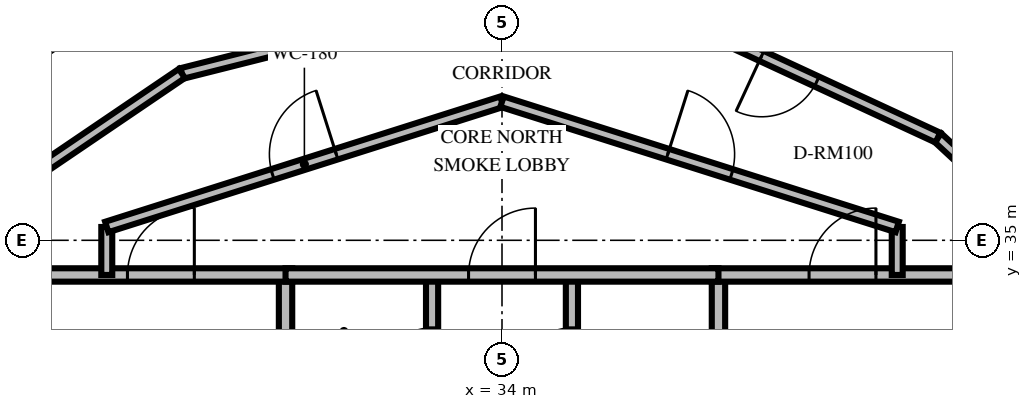
"""IFC4 building model, lengths in metres.
Left out: names, types, materials, properties, quantities, classifications, styles, units other than length and angle.
Written with IfcOpenShell. Run it as: python <this file> out.ifc"""

import sys

from ifc_helpers import new_model, si_unit, direction, frame, frame_2d, origin, place, context, subcontext, project, spatial, rectangle, extrude, element, fill, save


model = new_model("IFC4")
c1 = context("Model", 3, precision=1e-05, world=origin(), true_north=direction((0.0, 1.0)))
c2 = subcontext(c1, "Body", "Model", "MODEL_VIEW")
j1 = project(units=[si_unit("LENGTHUNIT", "METRE"), si_unit("PLANEANGLEUNIT", "RADIAN")], contexts=[c1])
p1 = place(None, origin())
s1 = spatial("IfcSite", under=j1, at=p1, CompositionType="ELEMENT")
p2 = place(p1, origin())
s2 = spatial("IfcBuilding", under=s1, at=p2, CompositionType="ELEMENT")
p3 = place(p2, frame((0.0, 0.0, 255.6)))
s3 = spatial("IfcBuildingStorey", under=s2, at=p3, CompositionType="ELEMENT", Elevation=255.6)
p4 = place(p3, frame((30.44, 30.05, 0.0), z_axis=(0.0, 0.0, 1.0), x_axis=(0.0, 1.0, 0.0)))
e1 = element("IfcWall", 1, at=p4, inside=s3, PredefinedType="SOLIDWALL", context=c2, shape_type="SweptSolid", body=[
    extrude(rectangle(XDim=4.38, YDim=0.22, at=frame_2d((2.19, 0.0))), origin(), (0.0, 0.0, 1.0), 2.46),
])
p5 = place(p4, frame((0.8, 0.0, 0.0)))
e2 = element("IfcOpeningElement", 2, at=p5, cuts=e1, PredefinedType="OPENING", context=c2, shape_type="SweptSolid", body=[
    extrude(rectangle(XDim=1.05, YDim=2.1, at=frame_2d((0.525, 1.05))), frame((0.0, 0.12, 0.0), z_axis=(0.0, -1.0, 0.0), x_axis=(1.0, 0.0, 0.0)), (0.0, 0.0, 1.0), 0.24),
])
p6 = place(p3, frame((26.24, 34.43, 0.0), z_axis=(0.0, 0.0, 1.0), x_axis=(1.0, 0.0, 0.0)))
e3 = element("IfcWall", 3, at=p6, inside=s3, PredefinedType="SOLIDWALL", context=c2, shape_type="SweptSolid", body=[
    extrude(rectangle(XDim=4.31, YDim=0.22, at=frame_2d((2.155, 0.0))), origin(), (0.0, 0.0, 1.0), 2.46),
])
p7 = place(p6, frame((1.6, 0.0, 0.0)))
e4 = element("IfcOpeningElement", 4, at=p7, cuts=e3, PredefinedType="OPENING", context=c2, shape_type="SweptSolid", body=[
    extrude(rectangle(XDim=1.1, YDim=2.15, at=frame_2d((0.55, 1.075))), frame((0.0, 0.12, 0.0), z_axis=(0.0, -1.0, 0.0), x_axis=(1.0, 0.0, 0.0)), (0.0, 0.0, 1.0), 0.24),
])
p8 = place(p3, frame((32.85, 30.05, 0.0), z_axis=(0.0, 0.0, 1.0), x_axis=(0.0, 1.0, 0.0)))
e5 = element("IfcWall", 5, at=p8, inside=s3, PredefinedType="SOLIDWALL", context=c2, shape_type="SweptSolid", body=[
    extrude(rectangle(XDim=4.38, YDim=0.2, at=frame_2d((2.19, 0.0))), origin(), (0.0, 0.0, 1.0), 2.46),
])
p9 = place(p8, frame((2.65, 0.0, 0.0)))
e6 = element("IfcOpeningElement", 6, at=p9, cuts=e5, PredefinedType="OPENING", context=c2, shape_type="SweptSolid", body=[
    extrude(rectangle(XDim=0.86, YDim=2.05, at=frame_2d((0.43, 1.025))), frame((0.0, 0.11, 0.0), z_axis=(0.0, -1.0, 0.0), x_axis=(1.0, 0.0, 0.0)), (0.0, 0.0, 1.0), 0.22),
])
p10 = place(p3, frame((37.56, 30.05, 0.0), z_axis=(0.0, 0.0, 1.0), x_axis=(0.0, 1.0, 0.0)))
e7 = element("IfcWall", 7, at=p10, inside=s3, PredefinedType="SOLIDWALL", context=c2, shape_type="SweptSolid", body=[
    extrude(rectangle(XDim=4.38, YDim=0.22, at=frame_2d((2.19, 0.0))), origin(), (0.0, 0.0, 1.0), 2.46),
])
p11 = place(p10, frame((0.8, 0.0, 0.0)))
e8 = element("IfcOpeningElement", 8, at=p11, cuts=e7, PredefinedType="OPENING", context=c2, shape_type="SweptSolid", body=[
    extrude(rectangle(XDim=1.05, YDim=2.1, at=frame_2d((0.525, 1.05))), frame((0.0, 0.12, 0.0), z_axis=(0.0, -1.0, 0.0), x_axis=(1.0, 0.0, 0.0)), (0.0, 0.0, 1.0), 0.24),
])
p12 = place(p3, frame((37.45, 34.43, 0.0), z_axis=(0.0, 0.0, 1.0), x_axis=(1.0, 0.0, 0.0)))
e9 = element("IfcWall", 9, at=p12, inside=s3, PredefinedType="SOLIDWALL", context=c2, shape_type="SweptSolid", body=[
    extrude(rectangle(XDim=4.31, YDim=0.22, at=frame_2d((2.155, 0.0))), origin(), (0.0, 0.0, 1.0), 2.46),
])
p13 = place(p12, frame((1.6, 0.0, 0.0)))
e10 = element("IfcOpeningElement", 10, at=p13, cuts=e9, PredefinedType="OPENING", context=c2, shape_type="SweptSolid", body=[
    extrude(rectangle(XDim=1.1, YDim=2.15, at=frame_2d((0.55, 1.075))), frame((0.0, 0.12, 0.0), z_axis=(0.0, -1.0, 0.0), x_axis=(1.0, 0.0, 0.0)), (0.0, 0.0, 1.0), 0.24),
])
p14 = place(p3, frame((35.15, 30.05, 0.0), z_axis=(0.0, 0.0, 1.0), x_axis=(0.0, 1.0, 0.0)))
e11 = element("IfcWall", 11, at=p14, inside=s3, PredefinedType="SOLIDWALL", context=c2, shape_type="SweptSolid", body=[
    extrude(rectangle(XDim=4.38, YDim=0.2, at=frame_2d((2.19, 0.0))), origin(), (0.0, 0.0, 1.0), 2.46),
])
p15 = place(p14, frame((2.65, 0.0, 0.0)))
e12 = element("IfcOpeningElement", 12, at=p15, cuts=e11, PredefinedType="OPENING", context=c2, shape_type="SweptSolid", body=[
    extrude(rectangle(XDim=0.86, YDim=2.05, at=frame_2d((0.43, 1.025))), frame((0.0, 0.11, 0.0), z_axis=(0.0, -1.0, 0.0), x_axis=(1.0, 0.0, 0.0)), (0.0, 0.0, 1.0), 0.22),
])
p16 = place(p3, frame((30.44, 34.43, 0.0), z_axis=(0.0, 0.0, 1.0), x_axis=(1.0, 0.0, 0.0)))
e13 = element("IfcWall", 13, at=p16, inside=s3, PredefinedType="SOLIDWALL", context=c2, shape_type="SweptSolid", body=[
    extrude(rectangle(XDim=7.12, YDim=0.22, at=frame_2d((3.56, 0.0))), origin(), (0.0, 0.0, 1.0), 2.46),
])
p17 = place(p16, frame((3.01, 0.0, 0.0)))
e14 = element("IfcOpeningElement", 14, at=p17, cuts=e13, PredefinedType="OPENING", context=c2, shape_type="SweptSolid", body=[
    extrude(rectangle(XDim=1.1, YDim=2.15, at=frame_2d((0.55, 1.075))), frame((0.0, 0.12, 0.0), z_axis=(0.0, -1.0, 0.0), x_axis=(1.0, 0.0, 0.0)), (0.0, 0.0, 1.0), 0.24),
])
for number, where, z_axis, x_axis in (
    (15, (27.5, 34.43, 0.0), (0.0, 0.0, 1.0), (0.0, 1.0, 0.0)),
    (16, (40.5, 35.219, 0.0), (0.0, 0.0, 1.0), (0.0, -1.0, 0.0)),
):
    element("IfcWall", number, at=place(p3, frame(where, z_axis=z_axis, x_axis=x_axis)), inside=s3, PredefinedType="PARTITIONING", context=c2, shape_type="SweptSolid", body=[
        extrude(rectangle(XDim=0.789, YDim=0.18, at=frame_2d((0.395, 0.0))), origin(), (0.0, 0.0, 1.0), 2.46),
    ])
p18 = place(p3, frame((27.5, 35.219, 0.0), z_axis=(0.0, 0.0, 1.0), x_axis=(0.953228121756, 0.302251795518, 0.0)))
e17 = element("IfcWall", 17, at=p18, inside=s3, PredefinedType="PARTITIONING", context=c2, shape_type="SweptSolid", body=[
    extrude(rectangle(XDim=6.819, YDim=0.18, at=frame_2d((3.409, 0.0))), origin(), (0.0, 0.0, 1.0), 2.46),
])
p19 = place(p18, frame((2.86, 0.0, 0.0)))
e18 = element("IfcOpeningElement", 18, at=p19, cuts=e17, PredefinedType="OPENING", context=c2, shape_type="SweptSolid", body=[
    extrude(rectangle(XDim=1.1, YDim=2.15, at=frame_2d((0.55, 1.075))), frame((0.0, 0.1, 0.0), z_axis=(0.0, -1.0, 0.0), x_axis=(1.0, 0.0, 0.0)), (0.0, 0.0, 1.0), 0.2),
])
p20 = place(p3, frame((34.0, 37.28, 0.0), z_axis=(0.0, 0.0, 1.0), x_axis=(0.953228121756, -0.302251795518, 0.0)))
e19 = element("IfcWall", 19, at=p20, inside=s3, PredefinedType="PARTITIONING", context=c2, shape_type="SweptSolid", body=[
    extrude(rectangle(XDim=6.819, YDim=0.18, at=frame_2d((3.409, 0.0))), origin(), (0.0, 0.0, 1.0), 2.46),
])
p21 = place(p20, frame((2.86, 0.0, 0.0)))
e20 = element("IfcOpeningElement", 20, at=p21, cuts=e19, PredefinedType="OPENING", context=c2, shape_type="SweptSolid", body=[
    extrude(rectangle(XDim=1.1, YDim=2.15, at=frame_2d((0.55, 1.075))), frame((0.0, 0.1, 0.0), z_axis=(0.0, -1.0, 0.0), x_axis=(1.0, 0.0, 0.0)), (0.0, 0.0, 1.0), 0.2),
])
p22 = place(p3, frame((44.121, 33.95, 0.0), z_axis=(0.0, 0.0, 1.0), x_axis=(-0.733136774685, 0.680081222799, 0.0)))
e21 = element("IfcWall", 21, at=p22, inside=s3, PredefinedType="PARTITIONING", context=c2, shape_type="SweptSolid", body=[
    extrude(rectangle(XDim=4.026, YDim=0.18, at=frame_2d((2.013, 0.0))), origin(), (0.0, 0.0, 1.0), 2.46),
])
p23 = place(p3, frame((41.169, 36.688, 0.0), z_axis=(0.0, 0.0, 1.0), x_axis=(-0.907413819327, 0.420238218746, 0.0)))
e22 = element("IfcWall", 22, at=p23, inside=s3, PredefinedType="PARTITIONING", context=c2, shape_type="SweptSolid", body=[
    extrude(rectangle(XDim=4.027, YDim=0.18, at=frame_2d((2.013, 0.0))), origin(), (0.0, 0.0, 1.0), 2.46),
])
p24 = place(p23, frame((2.195, 0.0, 0.0)))
e23 = element("IfcOpeningElement", 23, at=p24, cuts=e22, PredefinedType="OPENING", context=c2, shape_type="SweptSolid", body=[
    extrude(rectangle(XDim=1.0, YDim=2.15, at=frame_2d((0.5, 1.075))), frame((0.0, 0.1, 0.0), z_axis=(0.0, -1.0, 0.0), x_axis=(1.0, 0.0, 0.0)), (0.0, 0.0, 1.0), 0.2),
])
p25 = place(p3, frame((33.069, 38.836, 0.0), z_axis=(0.0, 0.0, 1.0), x_axis=(-0.969665095123, -0.244437319777, 0.0)))
e24 = element("IfcWall", 24, at=p25, inside=s3, PredefinedType="PARTITIONING", context=c2, shape_type="SweptSolid", body=[
    extrude(rectangle(XDim=4.469, YDim=0.18, at=frame_2d((2.235, 0.0))), origin(), (0.0, 0.0, 1.0), 2.46),
])
p26 = place(p3, frame((28.735, 37.744, 0.0), z_axis=(0.0, 0.0, 1.0), x_axis=(-0.827595393885, -0.561325096552, 0.0)))
e25 = element("IfcWall", 25, at=p26, inside=s3, PredefinedType="PARTITIONING", context=c2, shape_type="SweptSolid", body=[
    extrude(rectangle(XDim=4.47, YDim=0.18, at=frame_2d((2.235, 0.0))), origin(), (0.0, 0.0, 1.0), 2.46),
])
p27 = place(p3, frame((28.08, 39.204, 0.0), z_axis=(0.0, 0.0, 1.0), x_axis=(-0.827561219807, -0.561375478153, 0.0)))
e26 = element("IfcWall", 26, at=p27, inside=s3, PredefinedType="PARTITIONING", context=c2, shape_type="SweptSolid", body=[
    extrude(rectangle(XDim=5.025, YDim=0.125, at=frame_2d((2.513, 0.0))), origin(), (0.0, 0.0, 1.0), 2.46),
])
p28 = place(p7, origin())
e27 = element("IfcDoor", 27, at=p28, inside=s3, OperationType="SINGLE_SWING_RIGHT", PredefinedType="DOOR", context=c2, shape_type="SweptSolid", body=[
    extrude(rectangle(XDim=1.1, YDim=2.15, at=frame_2d((0.55, 1.075))), frame((0.0, 0.025, 0.0), z_axis=(0.0, -1.0, 0.0), x_axis=(1.0, 0.0, 0.0)), (0.0, 0.0, 1.0), 0.05),
])
fill(e4, e27)
p29 = place(p9, origin())
e28 = element("IfcDoor", 28, at=p29, inside=s3, OperationType="SINGLE_SWING_LEFT", PredefinedType="TRAPDOOR", context=c2, shape_type="SweptSolid", body=[
    extrude(rectangle(XDim=0.86, YDim=2.05, at=frame_2d((0.43, 1.025))), frame((0.0, 0.025, 0.0), z_axis=(0.0, -1.0, 0.0), x_axis=(1.0, 0.0, 0.0)), (0.0, 0.0, 1.0), 0.05),
])
fill(e6, e28)
p30 = place(p13, origin())
e29 = element("IfcDoor", 29, at=p30, inside=s3, OperationType="SINGLE_SWING_RIGHT", PredefinedType="DOOR", context=c2, shape_type="SweptSolid", body=[
    extrude(rectangle(XDim=1.1, YDim=2.15, at=frame_2d((0.55, 1.075))), frame((0.0, 0.025, 0.0), z_axis=(0.0, -1.0, 0.0), x_axis=(1.0, 0.0, 0.0)), (0.0, 0.0, 1.0), 0.05),
])
fill(e10, e29)
p31 = place(p15, origin())
e30 = element("IfcDoor", 30, at=p31, inside=s3, OperationType="SINGLE_SWING_LEFT", PredefinedType="TRAPDOOR", context=c2, shape_type="SweptSolid", body=[
    extrude(rectangle(XDim=0.86, YDim=2.05, at=frame_2d((0.43, 1.025))), frame((0.0, 0.025, 0.0), z_axis=(0.0, -1.0, 0.0), x_axis=(1.0, 0.0, 0.0)), (0.0, 0.0, 1.0), 0.05),
])
fill(e12, e30)
p32 = place(p17, origin())
e31 = element("IfcDoor", 31, at=p32, inside=s3, OperationType="SINGLE_SWING_RIGHT", PredefinedType="DOOR", context=c2, shape_type="SweptSolid", body=[
    extrude(rectangle(XDim=1.1, YDim=2.15, at=frame_2d((0.55, 1.075))), frame((0.0, 0.025, 0.0), z_axis=(0.0, -1.0, 0.0), x_axis=(1.0, 0.0, 0.0)), (0.0, 0.0, 1.0), 0.05),
])
fill(e14, e31)
p33 = place(p19, origin())
e32 = element("IfcDoor", 32, at=p33, inside=s3, OperationType="SINGLE_SWING_RIGHT", PredefinedType="DOOR", context=c2, shape_type="SweptSolid", body=[
    extrude(rectangle(XDim=1.1, YDim=2.15, at=frame_2d((0.55, 1.075))), frame((0.0, 0.025, 0.0), z_axis=(0.0, -1.0, 0.0), x_axis=(1.0, 0.0, 0.0)), (0.0, 0.0, 1.0), 0.05),
])
fill(e18, e32)
p34 = place(p21, origin())
e33 = element("IfcDoor", 33, at=p34, inside=s3, OperationType="SINGLE_SWING_LEFT", PredefinedType="DOOR", context=c2, shape_type="SweptSolid", body=[
    extrude(rectangle(XDim=1.1, YDim=2.15, at=frame_2d((0.55, 1.075))), frame((0.0, 0.025, 0.0), z_axis=(0.0, -1.0, 0.0), x_axis=(1.0, 0.0, 0.0)), (0.0, 0.0, 1.0), 0.05),
])
fill(e20, e33)
p35 = place(p24, origin())
e34 = element("IfcDoor", 34, at=p35, inside=s3, OperationType="SINGLE_SWING_RIGHT", PredefinedType="DOOR", context=c2, shape_type="SweptSolid", body=[
    extrude(rectangle(XDim=1.0, YDim=2.15, at=frame_2d((0.5, 1.075))), frame((0.0, 0.025, 0.0), z_axis=(0.0, -1.0, 0.0), x_axis=(1.0, 0.0, 0.0)), (0.0, 0.0, 1.0), 0.05),
])
fill(e23, e34)
save(model, sys.argv[1])
